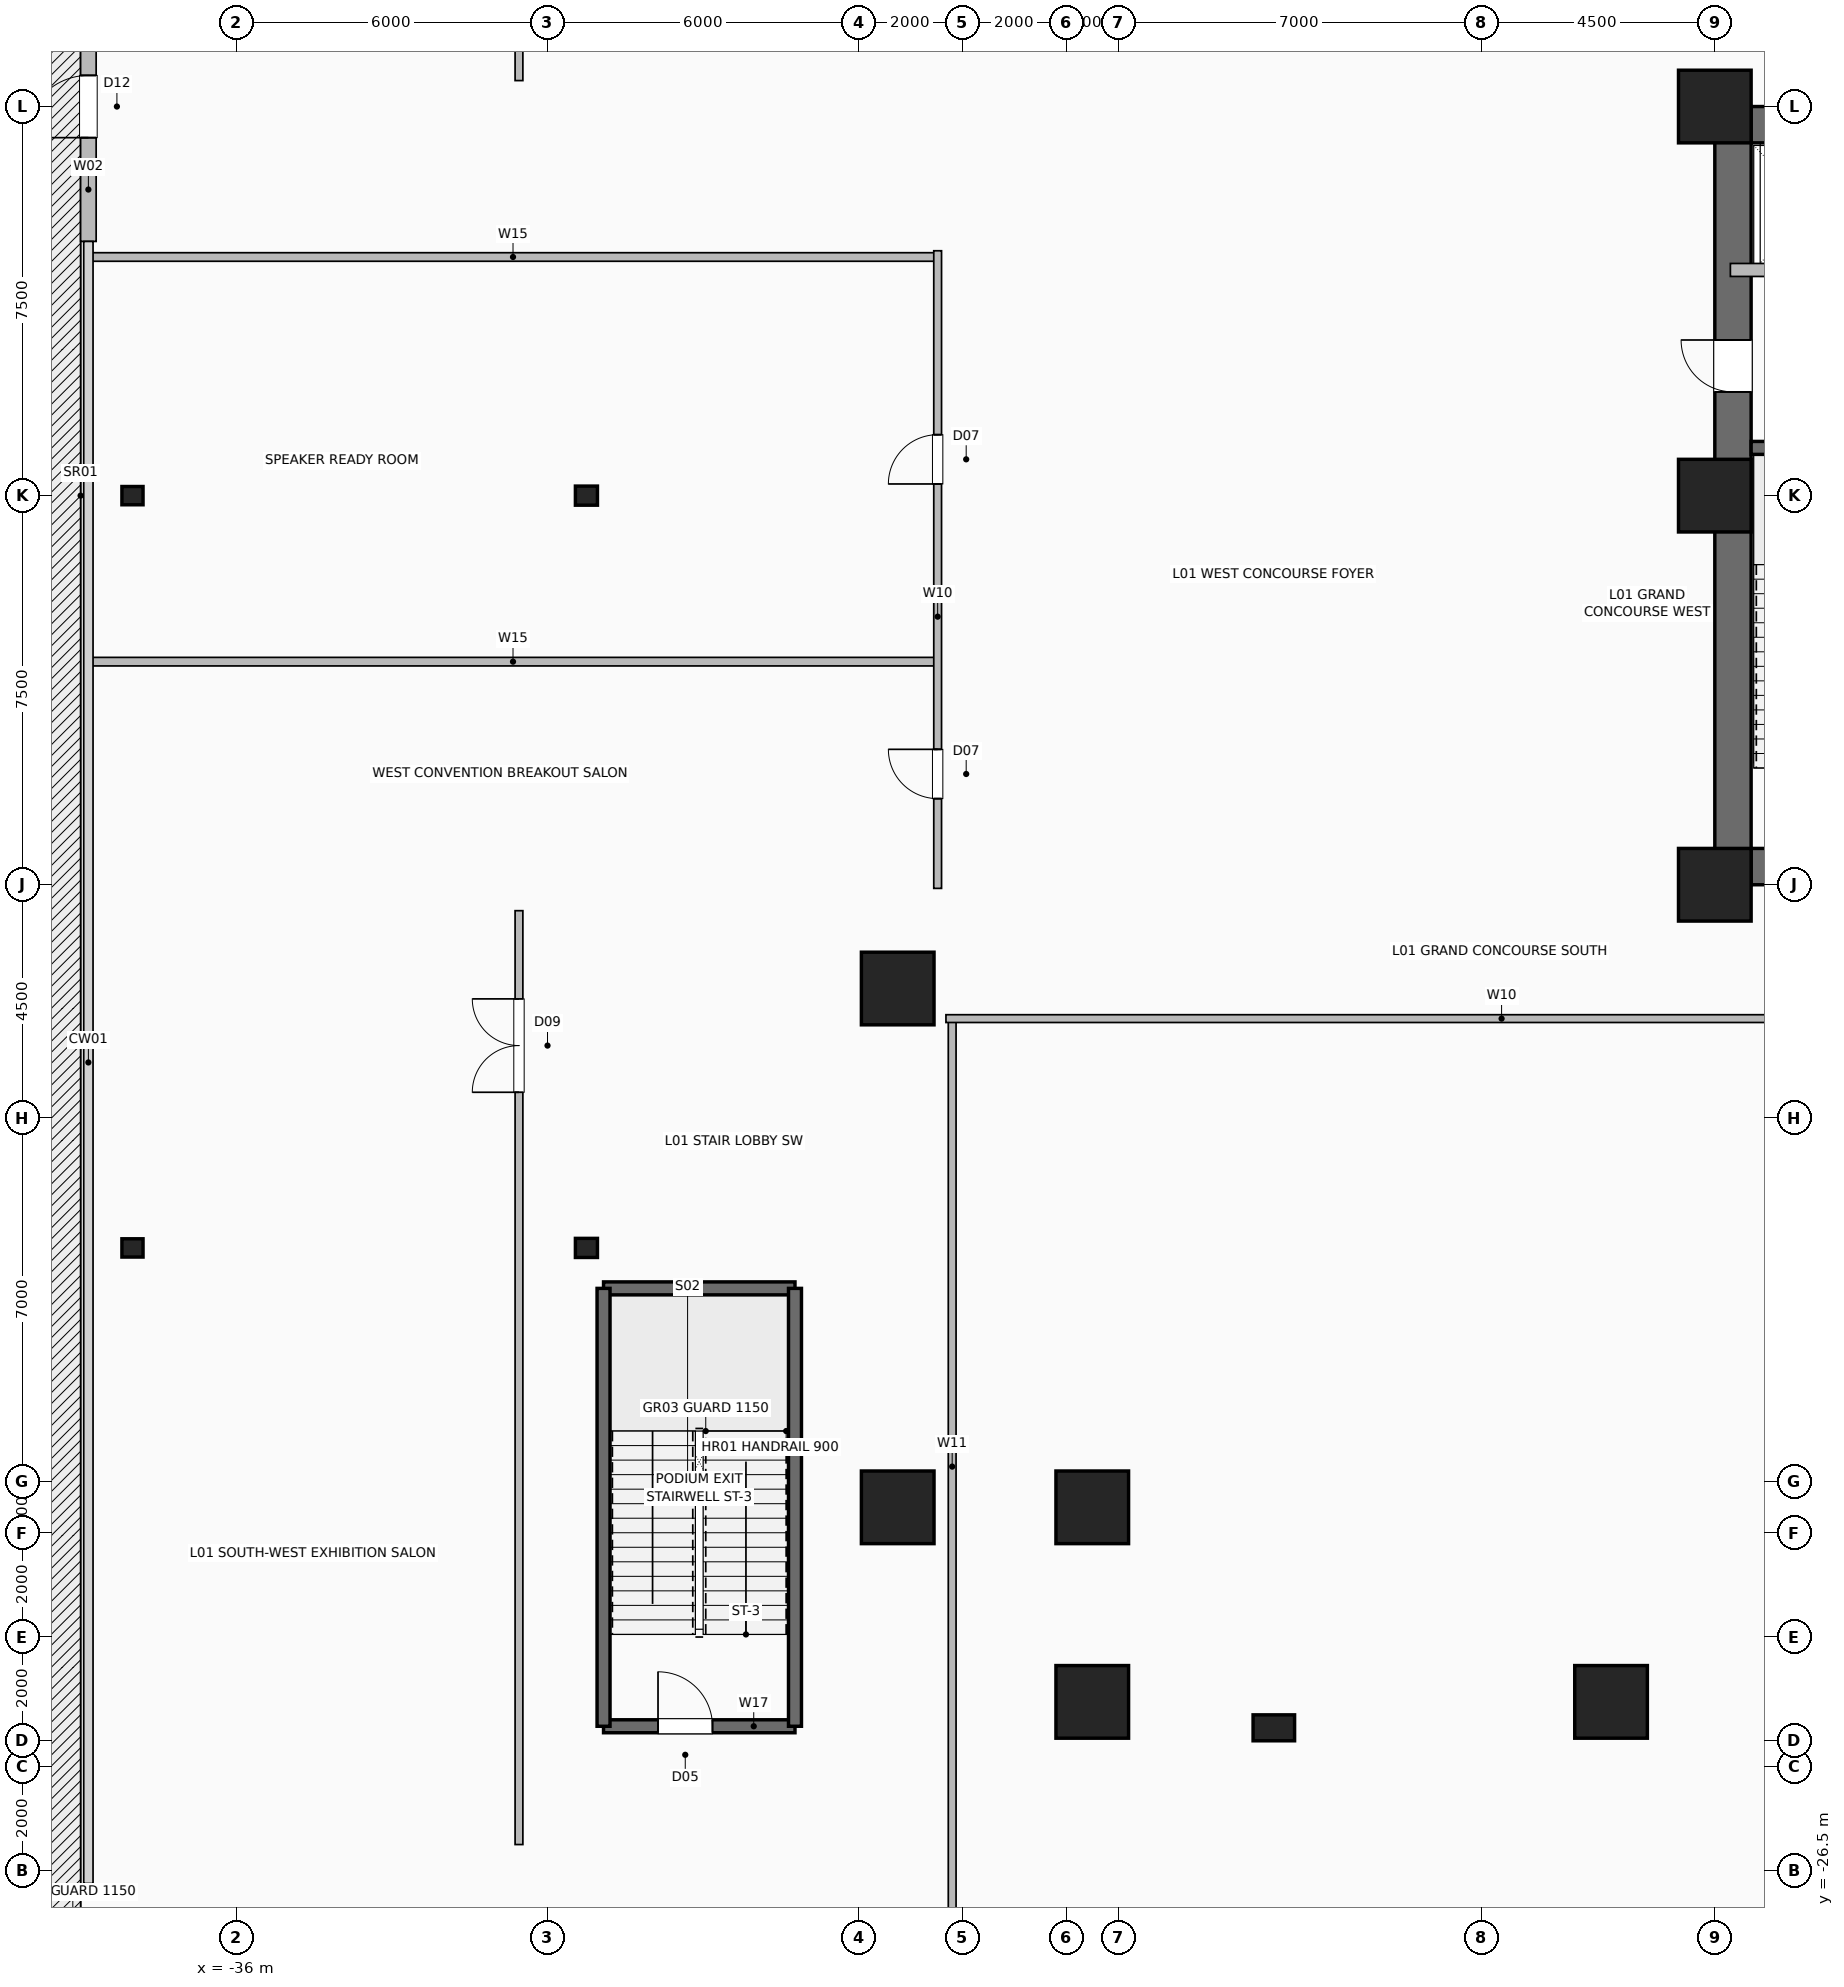
"""IFC4 building model, lengths in metres.
Left out: names, types, materials, properties, quantities, classifications, styles, units other than length and angle.
Written with IfcOpenShell. Run it as: python <this file> out.ifc"""

import sys

from ifc_helpers import new_model, si_unit, direction, frame, frame_2d, origin, origin_2d, place, context, subcontext, project, spatial, rectangle, hollow_rectangle, i_section, extrude, element, fill, save


model = new_model("IFC4")
c1 = context("Model", 3, precision=1e-05, world=origin(), true_north=direction((0.0, 1.0)))
c2 = subcontext(c1, "Body", "Model", "MODEL_VIEW")
j1 = project(units=[si_unit("LENGTHUNIT", "METRE"), si_unit("PLANEANGLEUNIT", "RADIAN")], contexts=[c1])
p1 = place(None, origin())
s1 = spatial("IfcSite", under=j1, at=p1, CompositionType="ELEMENT")
p2 = place(p1, origin())
s2 = spatial("IfcBuilding", under=s1, at=p2, CompositionType="ELEMENT")
p3 = place(p2, frame((0.0, 0.0, 5.4)))
s3 = spatial("IfcBuildingStorey", under=s2, at=p3, CompositionType="ELEMENT", Elevation=5.4)
for number, where, z_axis, x_axis in (
    (1, (-7.5, -7.5, 0.0), (0.0, 0.0, 1.0), (1.0, 0.0, 0.0)),
    (2, (-7.5, 7.5, 0.0), (0.0, 0.0, 1.0), (1.0, 0.0, 0.0)),
    (3, (-7.5, 0.0, 0.0), (0.0, 0.0, 1.0), (1.0, 0.0, 0.0)),
    (4, (-19.5, -23.25, 0.0), (0.0, 0.0, 1.0), (1.0, 0.0, 0.0)),
    (5, (-9.5, -23.25, 0.0), (0.0, 0.0, 1.0), (1.0, 0.0, 0.0)),
    (6, (-23.25, -19.5, 0.0), (0.0, 0.0, 1.0), (1.0, 0.0, 0.0)),
    (7, (-23.25, -9.5, 0.0), (0.0, 0.0, 1.0), (1.0, 0.0, 0.0)),
    (8, (-19.5, -19.5, 0.0), (0.0, 0.0, 1.0), (1.0, 0.0, 0.0)),
):
    element("IfcColumn", number, at=place(p3, frame(where, z_axis=z_axis, x_axis=x_axis)), inside=s3, PredefinedType="COLUMN", context=c2, shape_type="SweptSolid", body=[
        extrude(hollow_rectangle(XDim=1.4, YDim=1.4, WallThickness=0.06, at=origin_2d()), origin(), (0.0, 0.0, 1.0), 5.4),
    ])
for number, where, z_axis, x_axis in (
    (9, (-29.25, -14.5, 0.0), (0.0, 0.0, 1.0), (1.0, 0.0, 0.0)),
    (10, (-29.25, 0.0, 0.0), (0.0, 0.0, 1.0), (1.0, 0.0, 0.0)),
):
    element("IfcColumn", number, at=place(p3, frame(where, z_axis=z_axis, x_axis=x_axis)), inside=s3, PredefinedType="COLUMN", context=c2, shape_type="SweptSolid", body=[
        extrude(i_section(OverallWidth=0.368, OverallDepth=0.425, WebThickness=0.03, FlangeThickness=0.048, FilletRadius=0.02, at=origin_2d()), origin(), (0.0, 0.0, 1.0), 5.4),
    ])
for number, where, z_axis, x_axis in (
    (11, (-38.0, -14.5, -0.4), (0.0, 0.0, 1.0), (1.0, 0.0, 0.0)),
    (12, (-38.0, 0.0, -0.4), (0.0, 0.0, 1.0), (1.0, 0.0, 0.0)),
):
    element("IfcColumn", number, at=place(p3, frame(where, z_axis=z_axis, x_axis=x_axis)), inside=s3, PredefinedType="COLUMN", context=c2, shape_type="SweptSolid", body=[
        extrude(i_section(OverallWidth=0.352, OverallDepth=0.407, WebThickness=0.025, FlangeThickness=0.04, FilletRadius=0.02, at=origin_2d()), origin(), (0.0, 0.0, 1.0), 5.4),
    ])
p4 = place(p3, frame((-16.0, -23.75, 0.0), z_axis=(0.0, 0.0, 1.0), x_axis=(1.0, 0.0, 0.0)))
e13 = element("IfcColumn", 13, at=p4, inside=s3, PredefinedType="PILASTER", context=c2, shape_type="SweptSolid", body=[
    extrude(rectangle(XDim=0.5, YDim=0.8, at=origin_2d()), origin(), (0.0, 0.0, 1.0), 5.4),
])
p5 = place(p3, frame((-38.85, 4.9, 0.0), z_axis=(0.0, 0.0, 1.0), x_axis=(0.0, 1.0, 0.0)))
e14 = element("IfcWall", 14, at=p5, inside=s3, PredefinedType="SOLIDWALL", context=c2, shape_type="SweptSolid", body=[
    extrude(rectangle(XDim=5.2, YDim=0.3, at=frame_2d((2.6, 0.0))), origin(), (0.0, 0.0, 1.0), 5.0),
])
p6 = place(p5, frame((2.0, 0.0, 0.0)))
e15 = element("IfcOpeningElement", 15, at=p6, cuts=e14, PredefinedType="OPENING", context=c2, shape_type="SweptSolid", body=[
    extrude(rectangle(XDim=1.2, YDim=2.25, at=frame_2d((0.6, 1.125))), frame((0.0, 0.16, 0.0), z_axis=(0.0, -1.0, 0.0), x_axis=(1.0, 0.0, 0.0)), (0.0, 0.0, 1.0), 0.32),
])
p7 = place(p3, frame((-7.5, -7.15, 0.0), z_axis=(0.0, 0.0, 1.0), x_axis=(1.0, 0.0, 0.0)))
e16 = element("IfcWall", 16, at=p7, inside=s3, PredefinedType="SHEAR", context=c2, shape_type="SweptSolid", body=[
    extrude(rectangle(XDim=15.0, YDim=0.7, at=frame_2d((7.5, 0.0))), origin(), (0.0, 0.0, 1.0), 5.0),
])
p8 = place(p7, frame((1.55, 0.0, 0.0)))
e17 = element("IfcOpeningElement", 17, at=p8, cuts=e16, PredefinedType="OPENING", context=c2, shape_type="SweptSolid", body=[
    extrude(rectangle(XDim=1.05, YDim=2.08, at=frame_2d((0.525, 1.04))), frame((0.0, 0.36, 0.0), z_axis=(0.0, -1.0, 0.0), x_axis=(1.0, 0.0, 0.0)), (0.0, 0.0, 1.0), 0.72),
])
p9 = place(p7, frame((12.4, 0.0, 0.0)))
e18 = element("IfcOpeningElement", 18, at=p9, cuts=e16, PredefinedType="OPENING", context=c2, shape_type="SweptSolid", body=[
    extrude(rectangle(XDim=1.05, YDim=2.08, at=frame_2d((0.525, 1.04))), frame((0.0, 0.36, 0.0), z_axis=(0.0, -1.0, 0.0), x_axis=(1.0, 0.0, 0.0)), (0.0, 0.0, 1.0), 0.72),
])
p10 = place(p7, frame((4.64, 0.0, 0.0)))
e19 = element("IfcOpeningElement", 19, at=p10, cuts=e16, PredefinedType="OPENING", context=c2, shape_type="SweptSolid", body=[
    extrude(rectangle(XDim=1.1, YDim=2.2, at=frame_2d((0.55, 1.1))), frame((0.0, 0.36, 0.0), z_axis=(0.0, -1.0, 0.0), x_axis=(1.0, 0.0, 0.0)), (0.0, 0.0, 1.0), 0.72),
])
p11 = place(p7, frame((6.52, 0.0, 0.0)))
e20 = element("IfcOpeningElement", 20, at=p11, cuts=e16, PredefinedType="OPENING", context=c2, shape_type="SweptSolid", body=[
    extrude(rectangle(XDim=1.1, YDim=2.2, at=frame_2d((0.55, 1.1))), frame((0.0, 0.36, 0.0), z_axis=(0.0, -1.0, 0.0), x_axis=(1.0, 0.0, 0.0)), (0.0, 0.0, 1.0), 0.72),
])
p12 = place(p7, frame((8.4, 0.0, 0.0)))
e21 = element("IfcOpeningElement", 21, at=p12, cuts=e16, PredefinedType="OPENING", context=c2, shape_type="SweptSolid", body=[
    extrude(rectangle(XDim=1.1, YDim=2.2, at=frame_2d((0.55, 1.1))), frame((0.0, 0.36, 0.0), z_axis=(0.0, -1.0, 0.0), x_axis=(1.0, 0.0, 0.0)), (0.0, 0.0, 1.0), 0.72),
])
p13 = place(p3, frame((-7.5, 7.15, 0.0), z_axis=(0.0, 0.0, 1.0), x_axis=(1.0, 0.0, 0.0)))
e22 = element("IfcWall", 22, at=p13, inside=s3, PredefinedType="SHEAR", context=c2, shape_type="SweptSolid", body=[
    extrude(rectangle(XDim=15.0, YDim=0.7, at=frame_2d((7.5, 0.0))), origin(), (0.0, 0.0, 1.0), 5.0),
])
p14 = place(p3, frame((-7.15, -7.5, 0.0), z_axis=(0.0, 0.0, 1.0), x_axis=(0.0, 1.0, 0.0)))
e23 = element("IfcWall", 23, at=p14, inside=s3, PredefinedType="SHEAR", context=c2, shape_type="SweptSolid", body=[
    extrude(rectangle(XDim=15.0, YDim=0.7, at=frame_2d((7.5, 0.0))), origin(), (0.0, 0.0, 1.0), 5.0),
])
p15 = place(p14, frame((9.5, 0.0, 0.0)))
e24 = element("IfcOpeningElement", 24, at=p15, cuts=e23, PredefinedType="OPENING", context=c2, shape_type="SweptSolid", body=[
    extrude(rectangle(XDim=1.0, YDim=2.08, at=frame_2d((0.5, 1.04))), frame((0.0, 0.36, 0.0), z_axis=(0.0, -1.0, 0.0), x_axis=(1.0, 0.0, 0.0)), (0.0, 0.0, 1.0), 0.72),
])
p16 = place(p3, frame((-6.8, 0.92, 0.0), z_axis=(0.0, 0.0, 1.0), x_axis=(1.0, 0.0, 0.0)))
e25 = element("IfcWall", 25, at=p16, inside=s3, PredefinedType="SHEAR", context=c2, shape_type="SweptSolid", body=[
    extrude(rectangle(XDim=3.33, YDim=0.25, at=frame_2d((1.665, 0.0))), origin(), (0.0, 0.0, 1.0), 5.0),
])
p17 = place(p3, frame((-7.2, 4.35, 0.0), z_axis=(0.0, 0.0, 1.0), x_axis=(1.0, 0.0, 0.0)))
e26 = element("IfcWall", 26, at=p17, inside=s3, PredefinedType="SHEAR", context=c2, shape_type="SweptSolid", body=[
    extrude(rectangle(XDim=2.7, YDim=0.25, at=frame_2d((1.35, 0.0))), origin(), (0.0, 0.0, 1.0), 5.0),
])
p18 = place(p17, frame((0.75, 0.0, 0.0)))
e27 = element("IfcOpeningElement", 27, at=p18, cuts=e26, PredefinedType="OPENING", context=c2, shape_type="SweptSolid", body=[
    extrude(rectangle(XDim=1.2, YDim=2.2, at=frame_2d((0.6, 1.1))), frame((0.0, 0.135, 0.0), z_axis=(0.0, -1.0, 0.0), x_axis=(1.0, 0.0, 0.0)), (0.0, 0.0, 1.0), 0.27),
])
p19 = place(p3, frame((-28.92, -23.72, 0.0), z_axis=(0.0, 0.0, 1.0), x_axis=(1.0, 0.0, 0.0)))
e28 = element("IfcWall", 28, at=p19, inside=s3, PredefinedType="SHEAR", context=c2, shape_type="SweptSolid", body=[
    extrude(rectangle(XDim=3.69, YDim=0.25, at=frame_2d((1.845, 0.0))), origin(), (0.0, 0.0, 1.0), 5.0),
])
p20 = place(p19, frame((1.05, 0.0, 0.0)))
e29 = element("IfcOpeningElement", 29, at=p20, cuts=e28, PredefinedType="OPENING", context=c2, shape_type="SweptSolid", body=[
    extrude(rectangle(XDim=1.05, YDim=2.08, at=frame_2d((0.525, 1.04))), frame((0.0, 0.135, 0.0), z_axis=(0.0, -1.0, 0.0), x_axis=(1.0, 0.0, 0.0)), (0.0, 0.0, 1.0), 0.27),
])
p21 = place(p3, frame((-28.92, -15.28, 0.0), z_axis=(0.0, 0.0, 1.0), x_axis=(1.0, 0.0, 0.0)))
e30 = element("IfcWall", 30, at=p21, inside=s3, PredefinedType="SHEAR", context=c2, shape_type="SweptSolid", body=[
    extrude(rectangle(XDim=3.69, YDim=0.25, at=frame_2d((1.845, 0.0))), origin(), (0.0, 0.0, 1.0), 5.0),
])
for number, where, z_axis, x_axis in (
    (31, (-28.92, -23.72, 0.0), (0.0, 0.0, 1.0), (0.0, 1.0, 0.0)),
    (32, (-25.23, -23.72, 0.0), (0.0, 0.0, 1.0), (0.0, 1.0, 0.0)),
):
    element("IfcWall", number, at=place(p3, frame(where, z_axis=z_axis, x_axis=x_axis)), inside=s3, PredefinedType="SHEAR", context=c2, shape_type="SweptSolid", body=[
        extrude(rectangle(XDim=8.44, YDim=0.25, at=frame_2d((4.22, 0.0))), origin(), (0.0, 0.0, 1.0), 5.0),
    ])
p22 = place(p3, frame((-22.2, -27.35, 0.0), z_axis=(0.0, 0.0, 1.0), x_axis=(0.0, 1.0, 0.0)))
e33 = element("IfcWall", 33, at=p22, inside=s3, PredefinedType="PARTITIONING", context=c2, shape_type="SweptSolid", body=[
    extrude(rectangle(XDim=17.27, YDim=0.15, at=frame_2d((8.635, 0.0))), origin(), (0.0, 0.0, 1.0), 5.0),
])
p23 = place(p3, frame((-22.32, -10.08, 0.0), z_axis=(0.0, 0.0, 1.0), x_axis=(1.0, 0.0, 0.0)))
e34 = element("IfcWall", 34, at=p23, inside=s3, PredefinedType="PARTITIONING", context=c2, shape_type="SweptSolid", body=[
    extrude(rectangle(XDim=44.64, YDim=0.15, at=frame_2d((22.32, 0.0))), origin(), (0.0, 0.0, 1.0), 5.0),
])
p24 = place(p23, frame((21.42, 0.0, 0.0)))
e35 = element("IfcOpeningElement", 35, at=p24, cuts=e34, PredefinedType="OPENING", context=c2, shape_type="SweptSolid", body=[
    extrude(rectangle(XDim=1.8, YDim=2.08, at=frame_2d((0.9, 1.04))), frame((0.0, 0.085, 0.0), z_axis=(0.0, -1.0, 0.0), x_axis=(1.0, 0.0, 0.0)), (0.0, 0.0, 1.0), 0.17),
])
for number, where, z_axis, x_axis in (
    (36, (-38.85, -3.2, 0.0), (0.0, 0.0, 1.0), (1.0, 0.0, 0.0)),
    (37, (-38.85, 4.6, 0.0), (0.0, 0.0, 1.0), (1.0, 0.0, 0.0)),
):
    element("IfcWall", number, at=place(p3, frame(where, z_axis=z_axis, x_axis=x_axis)), inside=s3, PredefinedType="PLUMBINGWALL", context=c2, shape_type="SweptSolid", body=[
        extrude(rectangle(XDim=16.37, YDim=0.165, at=frame_2d((8.185, 0.0))), origin(), (0.0, 0.0, 1.0), 5.0),
    ])
p25 = place(p3, frame((-22.48, -7.57, 0.0), z_axis=(0.0, 0.0, 1.0), x_axis=(0.0, 1.0, 0.0)))
e38 = element("IfcWall", 38, at=p25, inside=s3, PredefinedType="PARTITIONING", context=c2, shape_type="SweptSolid", body=[
    extrude(rectangle(XDim=12.29, YDim=0.15, at=frame_2d((6.145, 0.0))), origin(), (0.0, 0.0, 1.0), 5.0),
])
p26 = place(p25, frame((1.73, 0.0, 0.0)))
e39 = element("IfcOpeningElement", 39, at=p26, cuts=e38, PredefinedType="OPENING", context=c2, shape_type="SweptSolid", body=[
    extrude(rectangle(XDim=0.95, YDim=2.06, at=frame_2d((0.475, 1.03))), frame((0.0, 0.085, 0.0), z_axis=(0.0, -1.0, 0.0), x_axis=(1.0, 0.0, 0.0)), (0.0, 0.0, 1.0), 0.17),
])
p27 = place(p25, frame((7.795, 0.0, 0.0)))
e40 = element("IfcOpeningElement", 40, at=p27, cuts=e38, PredefinedType="OPENING", context=c2, shape_type="SweptSolid", body=[
    extrude(rectangle(XDim=0.95, YDim=2.06, at=frame_2d((0.475, 1.03))), frame((0.0, 0.085, 0.0), z_axis=(0.0, -1.0, 0.0), x_axis=(1.0, 0.0, 0.0)), (0.0, 0.0, 1.0), 0.17),
])
p28 = place(p3, frame((-30.55, -26.0, 0.0), z_axis=(0.0, 0.0, 1.0), x_axis=(0.0, 1.0, 0.0)))
e41 = element("IfcWall", 41, at=p28, inside=s3, PredefinedType="PARTITIONING", context=c2, shape_type="SweptSolid", body=[
    extrude(rectangle(XDim=18.0, YDim=0.15, at=frame_2d((9.0, 0.0))), origin(), (0.0, 0.0, 1.0), 5.0),
])
p29 = place(p28, frame((14.5, 0.0, 0.0)))
e42 = element("IfcOpeningElement", 42, at=p29, cuts=e41, PredefinedType="OPENING", context=c2, shape_type="SweptSolid", body=[
    extrude(rectangle(XDim=1.8, YDim=2.08, at=frame_2d((0.9, 1.04))), frame((0.0, 0.085, 0.0), z_axis=(0.0, -1.0, 0.0), x_axis=(1.0, 0.0, 0.0)), (0.0, 0.0, 1.0), 0.17),
])
p30 = place(p3, frame((-30.55, 8.0, 0.0), z_axis=(0.0, 0.0, 1.0), x_axis=(0.0, 1.0, 0.0)))
e43 = element("IfcWall", 43, at=p30, inside=s3, PredefinedType="PARTITIONING", context=c2, shape_type="SweptSolid", body=[
    extrude(rectangle(XDim=18.0, YDim=0.15, at=frame_2d((9.0, 0.0))), origin(), (0.0, 0.0, 1.0), 5.0),
])
p31 = place(p30, frame((2.0, 0.0, 0.0)))
e44 = element("IfcOpeningElement", 44, at=p31, cuts=e43, PredefinedType="OPENING", context=c2, shape_type="SweptSolid", body=[
    extrude(rectangle(XDim=1.8, YDim=2.08, at=frame_2d((0.9, 1.04))), frame((0.0, 0.085, 0.0), z_axis=(0.0, -1.0, 0.0), x_axis=(1.0, 0.0, 0.0)), (0.0, 0.0, 1.0), 0.17),
])
p32 = place(p6, origin())
e45 = element("IfcDoor", 45, at=p32, inside=s3, OperationType="SINGLE_SWING_LEFT", PredefinedType="DOOR", context=c2, shape_type="SweptSolid", body=[
    extrude(rectangle(XDim=1.2, YDim=2.25, at=frame_2d((0.6, 1.125))), frame((0.0, 0.025, 0.0), z_axis=(0.0, -1.0, 0.0), x_axis=(1.0, 0.0, 0.0)), (0.0, 0.0, 1.0), 0.05),
])
fill(e15, e45)
p33 = place(p15, origin())
e46 = element("IfcDoor", 46, at=p33, inside=s3, OperationType="SINGLE_SWING_RIGHT", PredefinedType="DOOR", context=c2, shape_type="SweptSolid", body=[
    extrude(rectangle(XDim=1.0, YDim=2.08, at=frame_2d((0.5, 1.04))), frame((0.0, 0.025, 0.0), z_axis=(0.0, -1.0, 0.0), x_axis=(1.0, 0.0, 0.0)), (0.0, 0.0, 1.0), 0.05),
])
fill(e24, e46)
p34 = place(p20, origin())
e47 = element("IfcDoor", 47, at=p34, inside=s3, OperationType="SINGLE_SWING_LEFT", PredefinedType="DOOR", context=c2, shape_type="SweptSolid", body=[
    extrude(rectangle(XDim=1.05, YDim=2.08, at=frame_2d((0.525, 1.04))), frame((0.0, 0.025, 0.0), z_axis=(0.0, -1.0, 0.0), x_axis=(1.0, 0.0, 0.0)), (0.0, 0.0, 1.0), 0.05),
])
fill(e29, e47)
p35 = place(p26, origin())
e48 = element("IfcDoor", 48, at=p35, inside=s3, OperationType="SINGLE_SWING_RIGHT", PredefinedType="DOOR", context=c2, shape_type="SweptSolid", body=[
    extrude(rectangle(XDim=0.95, YDim=2.06, at=frame_2d((0.475, 1.03))), frame((0.0, 0.025, 0.0), z_axis=(0.0, -1.0, 0.0), x_axis=(1.0, 0.0, 0.0)), (0.0, 0.0, 1.0), 0.05),
])
fill(e39, e48)
p36 = place(p27, origin())
e49 = element("IfcDoor", 49, at=p36, inside=s3, OperationType="SINGLE_SWING_LEFT", PredefinedType="DOOR", context=c2, shape_type="SweptSolid", body=[
    extrude(rectangle(XDim=0.95, YDim=2.06, at=frame_2d((0.475, 1.03))), frame((0.0, 0.025, 0.0), z_axis=(0.0, -1.0, 0.0), x_axis=(1.0, 0.0, 0.0)), (0.0, 0.0, 1.0), 0.05),
])
fill(e40, e49)
p37 = place(p29, origin())
e50 = element("IfcDoor", 50, at=p37, inside=s3, OperationType="DOUBLE_DOOR_SINGLE_SWING", PredefinedType="DOOR", context=c2, shape_type="SweptSolid", body=[
    extrude(rectangle(XDim=1.8, YDim=2.08, at=frame_2d((0.9, 1.04))), frame((0.0, 0.025, 0.0), z_axis=(0.0, -1.0, 0.0), x_axis=(1.0, 0.0, 0.0)), (0.0, 0.0, 1.0), 0.05),
])
fill(e42, e50)
save(model, sys.argv[1])
